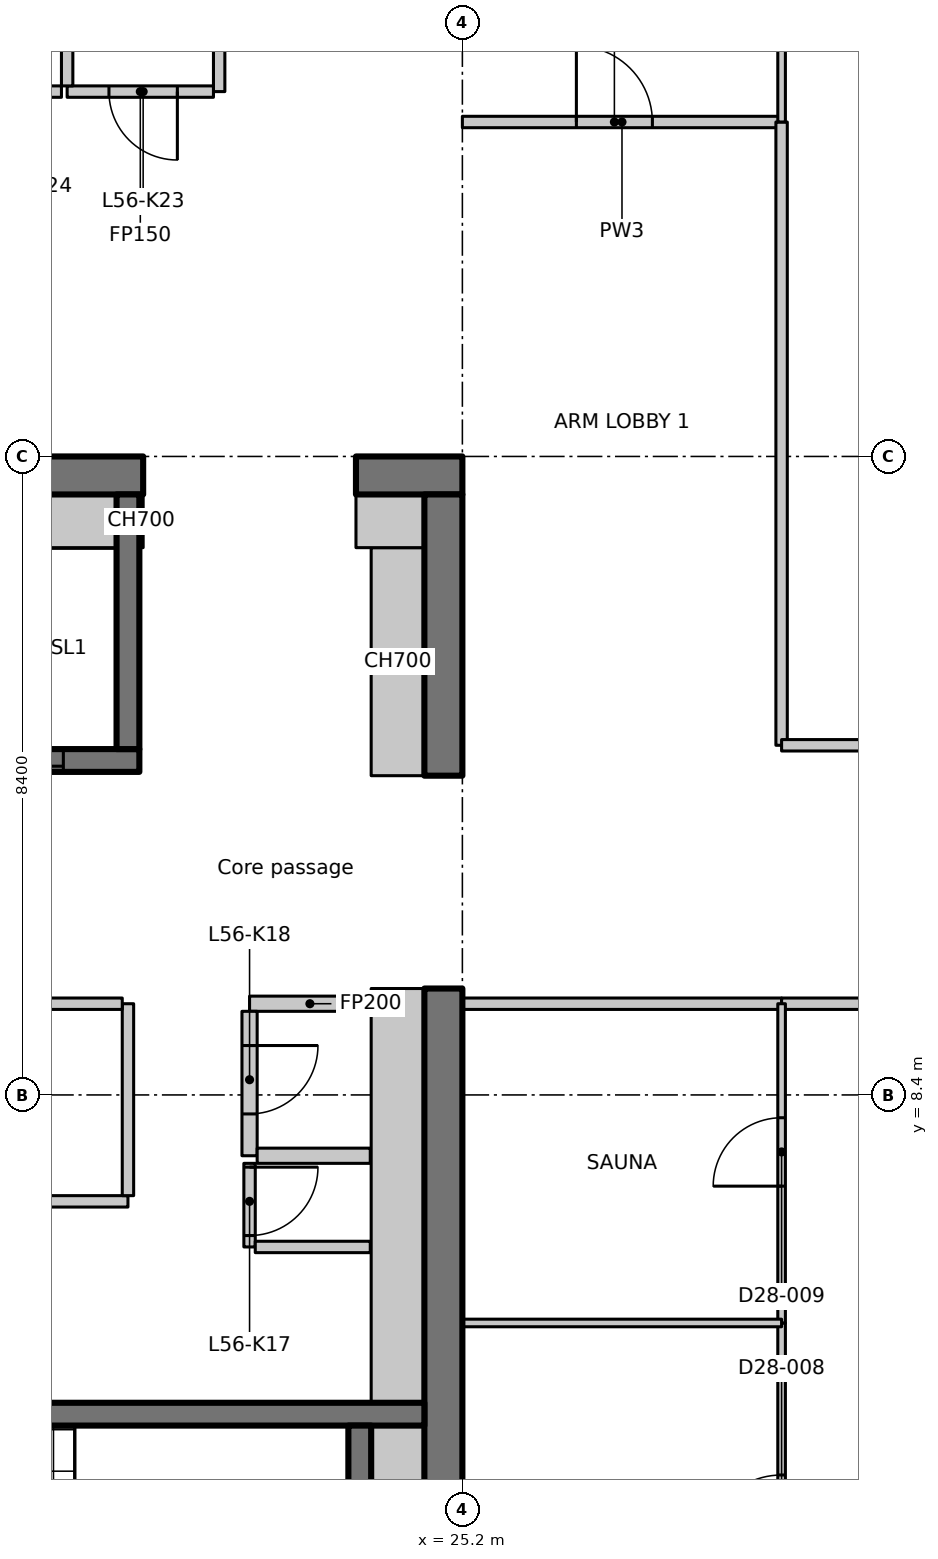
"""IFC4 building model, lengths in metres.
Left out: names, types, materials, properties, quantities, classifications, styles, units other than length and angle.
Written with IfcOpenShell. Run it as: python <this file> out.ifc"""

import sys

from ifc_helpers import new_model, si_unit, direction, frame, frame_2d, origin, place, context, subcontext, project, spatial, polyline, rectangle, outline, extrude, element, fill, save


model = new_model("IFC4")
c1 = context("Model", 3, precision=1e-05, world=origin(), true_north=direction((0.0, 1.0)))
c2 = subcontext(c1, "Body", "Model", "MODEL_VIEW")
j1 = project(units=[si_unit("LENGTHUNIT", "METRE"), si_unit("PLANEANGLEUNIT", "RADIAN")], contexts=[c1])
p1 = place(None, origin())
s1 = spatial("IfcSite", under=j1, at=p1, CompositionType="ELEMENT")
p2 = place(p1, origin())
s2 = spatial("IfcBuilding", under=s1, at=p2, CompositionType="ELEMENT")
p3 = place(p2, frame((0.0, 0.0, 222.9)))
s3 = spatial("IfcBuildingStorey", under=s2, at=p3, CompositionType="ELEMENT", Elevation=222.9)
p4 = place(p3, frame((-1.1, 16.55, 0.0), z_axis=(0.0, 0.0, 1.0), x_axis=(1.0, 0.0, 0.0)))
e1 = element("IfcWall", 1, at=p4, inside=s3, PredefinedType="SHEAR", context=c2, shape_type="SweptSolid", body=[
    extrude(rectangle(XDim=22.1, YDim=0.5, at=frame_2d((11.05, 0.0))), origin(), (0.0, 0.0, 1.0), 3.35),
])
p5 = place(p4, frame((3.15, 0.0, 0.0)))
e2 = element("IfcOpeningElement", 2, at=p5, cuts=e1, PredefinedType="OPENING", context=c2, shape_type="SweptSolid", body=[
    extrude(rectangle(XDim=1.1, YDim=2.3, at=frame_2d((0.55, 1.15))), frame((0.0, 0.26, 0.0), z_axis=(0.0, -1.0, 0.0), x_axis=(1.0, 0.0, 0.0)), (0.0, 0.0, 1.0), 0.52),
])
p6 = place(p3, frame((23.8, 16.55, 0.0), z_axis=(0.0, 0.0, 1.0), x_axis=(1.0, 0.0, 0.0)))
e3 = element("IfcWall", 3, at=p6, inside=s3, PredefinedType="SHEAR", context=c2, shape_type="SweptSolid", body=[
    extrude(rectangle(XDim=1.4, YDim=0.5, at=frame_2d((0.7, 0.0))), origin(), (0.0, 0.0, 1.0), 3.35),
])
p7 = place(p3, frame((24.95, 0.5, 0.0), z_axis=(0.0, 0.0, 1.0), x_axis=(0.0, 1.0, 0.0)))
e4 = element("IfcWall", 4, at=p7, inside=s3, PredefinedType="SHEAR", context=c2, shape_type="SweptSolid", body=[
    extrude(rectangle(XDim=9.3, YDim=0.5, at=frame_2d((4.65, 0.0))), origin(), (0.0, 0.0, 1.0), 3.35),
])
p8 = place(p3, frame((24.95, 12.6, 0.0), z_axis=(0.0, 0.0, 1.0), x_axis=(0.0, 1.0, 0.0)))
e5 = element("IfcWall", 5, at=p8, inside=s3, PredefinedType="SHEAR", context=c2, shape_type="SweptSolid", body=[
    extrude(rectangle(XDim=3.7, YDim=0.5, at=frame_2d((1.85, 0.0))), origin(), (0.0, 0.0, 1.0), 3.35),
])
p9 = place(p3, frame((24.35, 12.6, 0.0), z_axis=(0.0, 0.0, 1.0), x_axis=(0.0, 1.0, 0.0)))
e6 = element("IfcWall", 6, at=p9, inside=s3, PredefinedType="PARTITIONING", context=c2, shape_type="SweptSolid", body=[
    extrude(rectangle(XDim=3.0, YDim=0.7, at=frame_2d((1.5, 0.0))), origin(), (0.0, 0.0, 1.0), 3.35),
])
p10 = place(p3, frame((23.8, 15.95, 0.0), z_axis=(0.0, 0.0, 1.0), x_axis=(1.0, 0.0, 0.0)))
e7 = element("IfcWall", 7, at=p10, inside=s3, PredefinedType="PARTITIONING", context=c2, shape_type="SweptSolid", body=[
    extrude(rectangle(XDim=0.9, YDim=0.7, at=frame_2d((0.45, 0.0))), origin(), (0.0, 0.0, 1.0), 3.35),
])
p11 = place(p3, frame((17.85, 12.8, 0.0), z_axis=(0.0, 0.0, 1.0), x_axis=(1.0, 0.0, 0.0)))
e8 = element("IfcWall", 8, at=p11, inside=s3, PredefinedType="SHEAR", context=c2, shape_type="SweptSolid", body=[
    extrude(rectangle(XDim=3.1, YDim=0.3, at=frame_2d((1.55, 0.0))), origin(), (0.0, 0.0, 1.0), 3.35),
])
p12 = place(p11, frame((1.0, 0.0, 0.0)))
e9 = element("IfcOpeningElement", 9, at=p12, cuts=e8, PredefinedType="OPENING", context=c2, shape_type="SweptSolid", body=[
    extrude(rectangle(XDim=1.1, YDim=2.3, at=frame_2d((0.55, 1.15))), frame((0.0, 0.16, 0.0), z_axis=(0.0, -1.0, 0.0), x_axis=(1.0, 0.0, 0.0)), (0.0, 0.0, 1.0), 0.32),
])
p13 = place(p3, frame((20.8, 12.95, 0.0), z_axis=(0.0, 0.0, 1.0), x_axis=(0.0, 1.0, 0.0)))
e10 = element("IfcWall", 10, at=p13, inside=s3, PredefinedType="SHEAR", context=c2, shape_type="SweptSolid", body=[
    extrude(rectangle(XDim=3.35, YDim=0.3, at=frame_2d((1.675, 0.0))), origin(), (0.0, 0.0, 1.0), 3.35),
])
p14 = place(p3, frame((15.8, 4.2, 0.0), z_axis=(0.0, 0.0, 1.0), x_axis=(1.0, 0.0, 0.0)))
e11 = element("IfcWall", 11, at=p14, inside=s3, PredefinedType="SHEAR", context=c2, shape_type="SweptSolid", body=[
    extrude(rectangle(XDim=8.9, YDim=0.3, at=frame_2d((4.45, 0.0))), origin(), (0.0, 0.0, 1.0), 3.35),
])
p15 = place(p14, frame((0.4, 0.0, 0.0)))
e12 = element("IfcOpeningElement", 12, at=p15, cuts=e11, PredefinedType="OPENING", context=c2, shape_type="SweptSolid", body=[
    extrude(rectangle(XDim=1.0, YDim=2.1, at=frame_2d((0.5, 1.05))), frame((0.0, 0.16, 0.0), z_axis=(0.0, -1.0, 0.0), x_axis=(1.0, 0.0, 0.0)), (0.0, 0.0, 1.0), 0.32),
])
p16 = place(p3, frame((23.85, 1.5, 0.0), z_axis=(0.0, 0.0, 1.0), x_axis=(0.0, 1.0, 0.0)))
e13 = element("IfcWall", 13, at=p16, inside=s3, PredefinedType="SHEAR", context=c2, shape_type="SweptSolid", body=[
    extrude(rectangle(XDim=2.55, YDim=0.3, at=frame_2d((1.275, 0.0))), origin(), (0.0, 0.0, 1.0), 3.35),
])
p17 = place(p3, frame((23.988, 9.6, 0.0), z_axis=(0.0, 0.0, 1.0), x_axis=(-1.0, 0.0, 0.0)))
e14 = element("IfcWall", 14, at=p17, inside=s3, PredefinedType="PARTITIONING", context=c2, shape_type="SweptSolid", body=[
    extrude(rectangle(XDim=1.588, YDim=0.2, at=frame_2d((0.794, 0.0))), origin(), (0.0, 0.0, 1.0), 3.35),
])
p18 = place(p3, frame((22.4, 9.5, 0.0), z_axis=(0.0, 0.0, 1.0), x_axis=(0.0, -1.0, 0.0)))
e15 = element("IfcWall", 15, at=p18, inside=s3, PredefinedType="PARTITIONING", context=c2, shape_type="SweptSolid", body=[
    extrude(rectangle(XDim=1.9, YDim=0.2, at=frame_2d((0.95, 0.0))), origin(), (0.0, 0.0, 1.0), 3.35),
])
p19 = place(p18, frame((0.45, 0.0, 0.0)))
e16 = element("IfcOpeningElement", 16, at=p19, cuts=e15, PredefinedType="OPENING", context=c2, shape_type="SweptSolid", body=[
    extrude(rectangle(XDim=0.9, YDim=2.1, at=frame_2d((0.45, 1.05))), frame((0.0, 0.11, 0.0), z_axis=(0.0, -1.0, 0.0), x_axis=(1.0, 0.0, 0.0)), (0.0, 0.0, 1.0), 0.22),
])
p20 = place(p3, frame((22.5, 7.6, 0.0), z_axis=(0.0, 0.0, 1.0), x_axis=(1.0, 0.0, 0.0)))
e17 = element("IfcWall", 17, at=p20, inside=s3, PredefinedType="PARTITIONING", context=c2, shape_type="SweptSolid", body=[
    extrude(rectangle(XDim=1.488, YDim=0.2, at=frame_2d((0.744, 0.0))), origin(), (0.0, 0.0, 1.0), 3.35),
])
p21 = place(p3, frame((12.5, 7.0, 0.0), z_axis=(0.0, 0.0, 1.0), x_axis=(1.0, 0.0, 0.0)))
e18 = element("IfcWall", 18, at=p21, inside=s3, PredefinedType="PARTITIONING", context=c2, shape_type="SweptSolid", body=[
    extrude(rectangle(XDim=8.3, YDim=0.15, at=frame_2d((4.15, 0.0))), origin(), (0.0, 0.0, 1.0), 3.35),
])
p22 = place(p3, frame((20.8, 7.075, 0.0), z_axis=(0.0, 0.0, 1.0), x_axis=(0.0, 1.0, 0.0)))
e19 = element("IfcWall", 19, at=p22, inside=s3, PredefinedType="PARTITIONING", context=c2, shape_type="SweptSolid", body=[
    extrude(rectangle(XDim=2.525, YDim=0.15, at=frame_2d((1.263, 0.0))), origin(), (0.0, 0.0, 1.0), 3.35),
])
p23 = place(p3, frame((20.725, 9.6, 0.0), z_axis=(0.0, 0.0, 1.0), x_axis=(-1.0, 0.0, 0.0)))
e20 = element("IfcWall", 20, at=p23, inside=s3, PredefinedType="PARTITIONING", context=c2, shape_type="SweptSolid", body=[
    extrude(rectangle(XDim=8.225, YDim=0.15, at=frame_2d((4.113, 0.0))), origin(), (0.0, 0.0, 1.0), 3.35),
])
p24 = place(p23, frame((3.675, 0.0, 0.0)))
e21 = element("IfcOpeningElement", 21, at=p24, cuts=e20, PredefinedType="OPENING", context=c2, shape_type="SweptSolid", body=[
    extrude(rectangle(XDim=0.9, YDim=2.1, at=frame_2d((0.45, 1.05))), frame((0.0, 0.085, 0.0), z_axis=(0.0, -1.0, 0.0), x_axis=(1.0, 0.0, 0.0)), (0.0, 0.0, 1.0), 0.17),
])
p25 = place(p3, frame((22.0, 23.925, 0.0), z_axis=(0.0, 0.0, 1.0), x_axis=(0.0, -1.0, 0.0)))
e22 = element("IfcWall", 22, at=p25, inside=s3, PredefinedType="PARTITIONING", context=c2, shape_type="SweptSolid", body=[
    extrude(rectangle(XDim=2.325, YDim=0.15, at=frame_2d((1.163, 0.0))), origin(), (0.0, 0.0, 1.0), 3.35),
])
p26 = place(p3, frame((21.925, 21.6, 0.0), z_axis=(0.0, 0.0, 1.0), x_axis=(-1.0, 0.0, 0.0)))
e23 = element("IfcWall", 23, at=p26, inside=s3, PredefinedType="PARTITIONING", context=c2, shape_type="SweptSolid", body=[
    extrude(rectangle(XDim=1.925, YDim=0.15, at=frame_2d((0.962, 0.0))), origin(), (0.0, 0.0, 1.0), 3.35),
])
p27 = place(p26, frame((0.475, 0.0, 0.0)))
e24 = element("IfcOpeningElement", 24, at=p27, cuts=e23, PredefinedType="OPENING", context=c2, shape_type="SweptSolid", body=[
    extrude(rectangle(XDim=0.9, YDim=2.1, at=frame_2d((0.45, 1.05))), frame((0.0, 0.085, 0.0), z_axis=(0.0, -1.0, 0.0), x_axis=(1.0, 0.0, 0.0)), (0.0, 0.0, 1.0), 0.17),
])
p28 = place(p3, frame((20.0, 21.675, 0.0), z_axis=(0.0, 0.0, 1.0), x_axis=(0.0, 1.0, 0.0)))
e25 = element("IfcWall", 25, at=p28, inside=s3, PredefinedType="PARTITIONING", context=c2, shape_type="SweptSolid", body=[
    extrude(rectangle(XDim=2.25, YDim=0.15, at=frame_2d((1.125, 0.0))), origin(), (0.0, 0.0, 1.0), 3.35),
])
p29 = place(p3, frame((19.925, 21.6, 0.0), z_axis=(0.0, 0.0, 1.0), x_axis=(-1.0, 0.0, 0.0)))
e26 = element("IfcWall", 26, at=p29, inside=s3, PredefinedType="PARTITIONING", context=c2, shape_type="SweptSolid", body=[
    extrude(rectangle(XDim=2.325, YDim=0.15, at=frame_2d((1.163, 0.0))), origin(), (0.0, 0.0, 1.0), 3.35),
])
p30 = place(p29, frame((0.675, 0.0, 0.0)))
e27 = element("IfcOpeningElement", 27, at=p30, cuts=e26, PredefinedType="OPENING", context=c2, shape_type="SweptSolid", body=[
    extrude(rectangle(XDim=0.9, YDim=2.1, at=frame_2d((0.45, 1.05))), frame((0.0, 0.085, 0.0), z_axis=(0.0, -1.0, 0.0), x_axis=(1.0, 0.0, 0.0)), (0.0, 0.0, 1.0), 0.17),
])
p31 = place(p3, frame((22.4, 7.5, 0.0), z_axis=(0.0, 0.0, 1.0), x_axis=(0.0, -1.0, 0.0)))
e28 = element("IfcWall", 28, at=p31, inside=s3, PredefinedType="PARTITIONING", context=c2, shape_type="SweptSolid", body=[
    extrude(rectangle(XDim=1.1, YDim=0.15, at=frame_2d((0.55, 0.0))), origin(), (0.0, 0.0, 1.0), 3.35),
])
p32 = place(p31, frame((0.05, 0.0, 0.0)))
e29 = element("IfcOpeningElement", 29, at=p32, cuts=e28, PredefinedType="OPENING", context=c2, shape_type="SweptSolid", body=[
    extrude(rectangle(XDim=0.9, YDim=2.1, at=frame_2d((0.45, 1.05))), frame((0.0, 0.085, 0.0), z_axis=(0.0, -1.0, 0.0), x_axis=(1.0, 0.0, 0.0)), (0.0, 0.0, 1.0), 0.17),
])
p33 = place(p3, frame((22.475, 6.4, 0.0), z_axis=(0.0, 0.0, 1.0), x_axis=(1.0, 0.0, 0.0)))
e30 = element("IfcWall", 30, at=p33, inside=s3, PredefinedType="PARTITIONING", context=c2, shape_type="SweptSolid", body=[
    extrude(rectangle(XDim=1.513, YDim=0.15, at=frame_2d((0.756, 0.0))), origin(), (0.0, 0.0, 1.0), 3.35),
])
p34 = place(p3, frame((18.15, 15.95, 0.0), z_axis=(0.0, 0.0, 1.0), x_axis=(1.0, 0.0, 0.0)))
e31 = element("IfcWall", 31, at=p34, inside=s3, PredefinedType="PARTITIONING", context=c2, shape_type="SweptSolid", body=[
    extrude(rectangle(XDim=2.5, YDim=0.7, at=frame_2d((1.25, 0.0))), origin(), (0.0, 0.0, 1.0), 3.35),
])
p35 = place(p3, frame((20.95, 15.95, 0.0), z_axis=(0.0, 0.0, 1.0), x_axis=(1.0, 0.0, 0.0)))
e32 = element("IfcWall", 32, at=p35, inside=s3, PredefinedType="PARTITIONING", context=c2, shape_type="SweptSolid", body=[
    extrude(rectangle(XDim=0.05, YDim=0.7, at=frame_2d((0.025, 0.0))), origin(), (0.0, 0.0, 1.0), 3.35),
])
p36 = place(p3, frame((24.35, 1.5, 0.0), z_axis=(0.0, 0.0, 1.0), x_axis=(0.0, 1.0, 0.0)))
e33 = element("IfcWall", 33, at=p36, inside=s3, PredefinedType="PARTITIONING", context=c2, shape_type="SweptSolid", body=[
    extrude(rectangle(XDim=2.55, YDim=0.7, at=frame_2d((1.275, 0.0))), origin(), (0.0, 0.0, 1.0), 3.35),
])
p37 = place(p3, frame((24.35, 4.35, 0.0), z_axis=(0.0, 0.0, 1.0), x_axis=(0.0, 1.0, 0.0)))
e34 = element("IfcWall", 34, at=p37, inside=s3, PredefinedType="PARTITIONING", context=c2, shape_type="SweptSolid", body=[
    extrude(rectangle(XDim=5.45, YDim=0.7, at=frame_2d((2.725, 0.0))), origin(), (0.0, 0.0, 1.0), 3.35),
])
p38 = place(p3, frame((25.2, 21.2, 0.0), z_axis=(0.0, 0.0, 1.0), x_axis=(1.0, 0.0, 0.0)))
e35 = element("IfcWall", 35, at=p38, inside=s3, PredefinedType="PARTITIONING", context=c2, shape_type="SweptSolid", body=[
    extrude(rectangle(XDim=4.2, YDim=0.15, at=frame_2d((2.1, 0.0))), origin(), (0.0, 0.0, 1.0), 3.33),
])
p39 = place(p38, frame((1.5, 0.0, 0.0)))
e36 = element("IfcOpeningElement", 36, at=p39, cuts=e35, PredefinedType="OPENING", context=c2, shape_type="SweptSolid", body=[
    extrude(rectangle(XDim=1.0, YDim=2.1, at=frame_2d((0.5, 1.05))), frame((0.0, 0.085, 0.0), z_axis=(0.0, -1.0, 0.0), x_axis=(1.0, 0.0, 0.0)), (0.0, 0.0, 1.0), 0.17),
])
p40 = place(p3, frame((29.4, 9.6, 0.0), z_axis=(0.0, 0.0, 1.0), x_axis=(-1.0, 0.0, 0.0)))
e37 = element("IfcWall", 37, at=p40, inside=s3, PredefinedType="PARTITIONING", context=c2, shape_type="SweptSolid", body=[
    extrude(rectangle(XDim=4.2, YDim=0.15, at=frame_2d((2.1, 0.0))), origin(), (0.0, 0.0, 1.0), 3.33),
])
p41 = place(p3, frame((29.4, 21.2, 0.0), z_axis=(0.0, 0.0, 1.0), x_axis=(0.0, -1.0, 0.0)))
e38 = element("IfcWall", 38, at=p41, inside=s3, PredefinedType="PARTITIONING", context=c2, shape_type="SweptSolid", body=[
    extrude(rectangle(XDim=8.2, YDim=0.15, at=frame_2d((4.1, 0.0))), origin(), (0.0, 0.0, 1.0), 3.33),
])
p42 = place(p3, frame((29.4, 27.429, 0.0), z_axis=(0.0, 0.0, 1.0), x_axis=(0.0, -1.0, 0.0)))
e39 = element("IfcWall", 39, at=p42, inside=s3, PredefinedType="PARTITIONING", context=c2, shape_type="SweptSolid", body=[
    extrude(outline(polyline([(0.0, 0.0), (6.229, 0.0), (6.229, 3.33), (2.679, 3.33), (2.677, 2.98), (1.781, 2.98), (1.779, 3.33), (0.154, 3.33), (0.0, 3.33), (0.0, 0.0)])), frame((0.0, 0.05, 0.0), z_axis=(0.0, -1.0, 0.0), x_axis=(1.0, 0.0, 0.0)), (0.0, 0.0, 1.0), 0.1),
])
p43 = place(p3, frame((37.8, 9.6, 0.0), z_axis=(0.0, 0.0, 1.0), x_axis=(-1.0, 0.0, 0.0)))
e40 = element("IfcWall", 40, at=p43, inside=s3, PredefinedType="PARTITIONING", context=c2, shape_type="SweptSolid", body=[
    extrude(rectangle(XDim=8.4, YDim=0.15, at=frame_2d((4.2, 0.0))), origin(), (0.0, 0.0, 1.0), 3.33),
])
p44 = place(p43, frame((4.8, 0.0, 0.0)))
e41 = element("IfcOpeningElement", 41, at=p44, cuts=e40, PredefinedType="OPENING", context=c2, shape_type="SweptSolid", body=[
    extrude(rectangle(XDim=2.0, YDim=2.4, at=frame_2d((1.0, 1.2))), frame((0.0, 0.085, 0.0), z_axis=(0.0, -1.0, 0.0), x_axis=(1.0, 0.0, 0.0)), (0.0, 0.0, 1.0), 0.17),
])
p45 = place(p3, frame((29.4, 13.0, 0.0), z_axis=(0.0, 0.0, 1.0), x_axis=(1.0, 0.0, 0.0)))
e42 = element("IfcWall", 42, at=p45, inside=s3, PredefinedType="PARTITIONING", context=c2, shape_type="SweptSolid", body=[
    extrude(rectangle(XDim=8.4, YDim=0.15, at=frame_2d((4.2, 0.0))), origin(), (0.0, 0.0, 1.0), 3.33),
])
p46 = place(p45, frame((3.3, 0.0, 0.0)))
e43 = element("IfcOpeningElement", 43, at=p46, cuts=e42, PredefinedType="OPENING", context=c2, shape_type="SweptSolid", body=[
    extrude(rectangle(XDim=1.8, YDim=2.1, at=frame_2d((0.9, 1.05))), frame((0.0, 0.085, 0.0), z_axis=(0.0, -1.0, 0.0), x_axis=(1.0, 0.0, 0.0)), (0.0, 0.0, 1.0), 0.17),
])
p47 = place(p3, frame((29.4, 0.6, 0.0), z_axis=(0.0, 0.0, 1.0), x_axis=(0.0, 1.0, 0.0)))
e44 = element("IfcWall", 44, at=p47, inside=s3, PredefinedType="PARTITIONING", context=c2, shape_type="SweptSolid", body=[
    extrude(rectangle(XDim=4.8, YDim=0.1, at=frame_2d((2.4, 0.0))), origin(), (0.0, 0.0, 1.0), 3.33),
])
p48 = place(p47, frame((1.8, 0.0, 0.0)))
e45 = element("IfcOpeningElement", 45, at=p48, cuts=e44, PredefinedType="OPENING", context=c2, shape_type="SweptSolid", body=[
    extrude(rectangle(XDim=1.0, YDim=2.1, at=frame_2d((0.5, 1.05))), frame((0.0, 0.06, 0.0), z_axis=(0.0, -1.0, 0.0), x_axis=(1.0, 0.0, 0.0)), (0.0, 0.0, 1.0), 0.12),
])
p49 = place(p3, frame((29.4, 5.4, 0.0), z_axis=(0.0, 0.0, 1.0), x_axis=(0.0, 1.0, 0.0)))
e46 = element("IfcWall", 46, at=p49, inside=s3, PredefinedType="PARTITIONING", context=c2, shape_type="SweptSolid", body=[
    extrude(rectangle(XDim=4.2, YDim=0.1, at=frame_2d((2.1, 0.0))), origin(), (0.0, 0.0, 1.0), 3.33),
])
p50 = place(p49, frame((1.8, 0.0, 0.0)))
e47 = element("IfcOpeningElement", 47, at=p50, cuts=e46, PredefinedType="OPENING", context=c2, shape_type="SweptSolid", body=[
    extrude(rectangle(XDim=0.9, YDim=2.1, at=frame_2d((0.45, 1.05))), frame((0.0, 0.06, 0.0), z_axis=(0.0, -1.0, 0.0), x_axis=(1.0, 0.0, 0.0)), (0.0, 0.0, 1.0), 0.12),
])
p51 = place(p3, frame((25.2, 5.4, 0.0), z_axis=(0.0, 0.0, 1.0), x_axis=(1.0, 0.0, 0.0)))
e48 = element("IfcWall", 48, at=p51, inside=s3, PredefinedType="PARTITIONING", context=c2, shape_type="SweptSolid", body=[
    extrude(rectangle(XDim=4.2, YDim=0.1, at=frame_2d((2.1, 0.0))), origin(), (0.0, 0.0, 1.0), 3.33),
])
p52 = place(p12, origin())
e49 = element("IfcDoor", 49, at=p52, inside=s3, OperationType="SLIDING_TO_LEFT", PredefinedType="DOOR", context=c2, shape_type="SweptSolid", body=[
    extrude(rectangle(XDim=1.1, YDim=2.3, at=frame_2d((0.55, 1.15))), frame((0.0, 0.025, 0.0), z_axis=(0.0, -1.0, 0.0), x_axis=(1.0, 0.0, 0.0)), (0.0, 0.0, 1.0), 0.05),
])
fill(e9, e49)
p53 = place(p32, origin())
e50 = element("IfcDoor", 50, at=p53, inside=s3, OperationType="SINGLE_SWING_RIGHT", PredefinedType="DOOR", context=c2, shape_type="SweptSolid", body=[
    extrude(rectangle(XDim=0.9, YDim=2.1, at=frame_2d((0.45, 1.05))), frame((0.0, 0.025, 0.0), z_axis=(0.0, -1.0, 0.0), x_axis=(1.0, 0.0, 0.0)), (0.0, 0.0, 1.0), 0.05),
])
fill(e29, e50)
p54 = place(p19, origin())
e51 = element("IfcDoor", 51, at=p54, inside=s3, OperationType="SINGLE_SWING_LEFT", PredefinedType="DOOR", context=c2, shape_type="SweptSolid", body=[
    extrude(rectangle(XDim=0.9, YDim=2.1, at=frame_2d((0.45, 1.05))), frame((0.0, 0.025, 0.0), z_axis=(0.0, -1.0, 0.0), x_axis=(1.0, 0.0, 0.0)), (0.0, 0.0, 1.0), 0.05),
])
fill(e16, e51)
p55 = place(p27, origin())
e52 = element("IfcDoor", 52, at=p55, inside=s3, OperationType="SINGLE_SWING_RIGHT", PredefinedType="DOOR", context=c2, shape_type="SweptSolid", body=[
    extrude(rectangle(XDim=0.9, YDim=2.1, at=frame_2d((0.45, 1.05))), frame((0.0, 0.025, 0.0), z_axis=(0.0, -1.0, 0.0), x_axis=(1.0, 0.0, 0.0)), (0.0, 0.0, 1.0), 0.05),
])
fill(e24, e52)
p56 = place(p39, origin())
e53 = element("IfcDoor", 53, at=p56, inside=s3, OperationType="SINGLE_SWING_LEFT", PredefinedType="DOOR", context=c2, shape_type="SweptSolid", body=[
    extrude(rectangle(XDim=1.0, YDim=2.1, at=frame_2d((0.5, 1.05))), frame((0.0, 0.025, 0.0), z_axis=(0.0, -1.0, 0.0), x_axis=(1.0, 0.0, 0.0)), (0.0, 0.0, 1.0), 0.05),
])
fill(e36, e53)
p57 = place(p48, origin())
e54 = element("IfcDoor", 54, at=p57, inside=s3, OperationType="SINGLE_SWING_LEFT", PredefinedType="DOOR", context=c2, shape_type="SweptSolid", body=[
    extrude(rectangle(XDim=1.0, YDim=2.1, at=frame_2d((0.5, 1.05))), frame((0.0, 0.025, 0.0), z_axis=(0.0, -1.0, 0.0), x_axis=(1.0, 0.0, 0.0)), (0.0, 0.0, 1.0), 0.05),
])
fill(e45, e54)
p58 = place(p50, origin())
e55 = element("IfcDoor", 55, at=p58, inside=s3, OperationType="SINGLE_SWING_LEFT", PredefinedType="DOOR", context=c2, shape_type="SweptSolid", body=[
    extrude(rectangle(XDim=0.9, YDim=2.1, at=frame_2d((0.45, 1.05))), frame((0.0, 0.025, 0.0), z_axis=(0.0, -1.0, 0.0), x_axis=(1.0, 0.0, 0.0)), (0.0, 0.0, 1.0), 0.05),
])
fill(e47, e55)
save(model, sys.argv[1])
